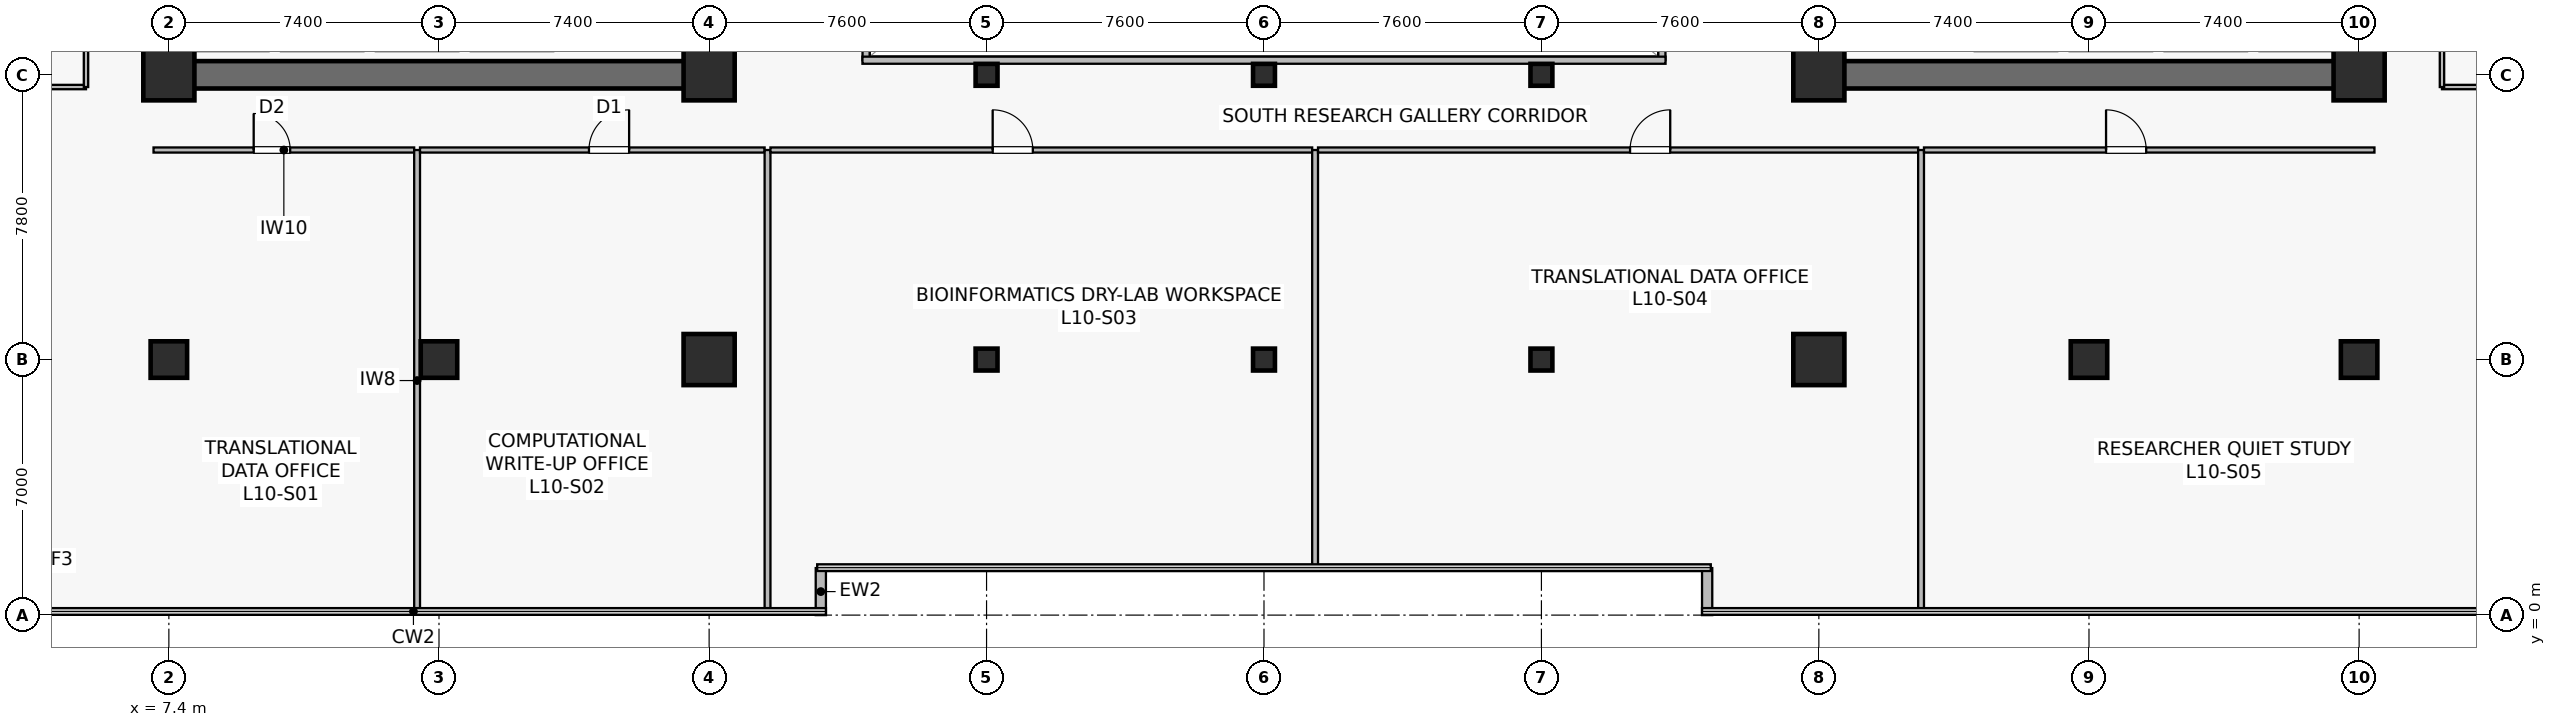
"""IFC4 building model, lengths in metres.
Left out: names, types, materials, properties, quantities, classifications, styles, units other than length and angle.
Written with IfcOpenShell. Run it as: python <this file> out.ifc"""

import sys

from ifc_helpers import new_model, si_unit, direction, frame, frame_2d, origin, origin_2d, place, context, subcontext, project, spatial, rectangle, hollow_rectangle, extrude, source, transform, mapped, element, fill, save


model = new_model("IFC4")
c1 = context("Model", 3, precision=1e-05, world=origin(), true_north=direction((0.0, 1.0)))
c2 = subcontext(c1, "Body", "Model", "MODEL_VIEW")
j1 = project(units=[si_unit("LENGTHUNIT", "METRE"), si_unit("PLANEANGLEUNIT", "RADIAN")], contexts=[c1])
p1 = place(None, origin())
s1 = spatial("IfcSite", under=j1, at=p1, CompositionType="ELEMENT")
p2 = place(p1, origin())
s2 = spatial("IfcBuilding", under=s1, at=p2, CompositionType="ELEMENT")
p3 = place(p2, frame((0.0, 0.0, 41.6)))
s3 = spatial("IfcBuildingStorey", under=s2, at=p3, CompositionType="ELEMENT", Elevation=41.6)
p4 = place(p3, frame((7.025, 14.8, 0.0), z_axis=(0.0, 0.0, 1.0), x_axis=(1.0, 0.0, 0.0)))
e1 = element("IfcWall", 1, at=p4, inside=s3, PredefinedType="SHEAR", context=c2, shape_type="SweptSolid", body=[
    extrude(rectangle(XDim=15.55, YDim=0.75, at=frame_2d((7.775, 0.0))), origin(), (0.0, 0.0, 1.0), 3.78),
])
p5 = place(p3, frame((7.4, 15.175, 0.0), z_axis=(0.0, 0.0, 1.0), x_axis=(0.0, 1.0, 0.0)))
e2 = element("IfcWall", 2, at=p5, inside=s3, PredefinedType="SHEAR", context=c2, shape_type="SweptSolid", body=[
    extrude(rectangle(XDim=18.25, YDim=0.75, at=frame_2d((9.125, 0.0))), origin(), (0.0, 0.0, 1.0), 3.78),
])
p6 = place(p3, frame((22.2, 15.175, 0.0), z_axis=(0.0, 0.0, 1.0), x_axis=(0.0, 1.0, 0.0)))
e3 = element("IfcWall", 3, at=p6, inside=s3, PredefinedType="SHEAR", context=c2, shape_type="SweptSolid", body=[
    extrude(rectangle(XDim=18.25, YDim=0.75, at=frame_2d((9.125, 0.0))), origin(), (0.0, 0.0, 1.0), 3.78),
])
p7 = place(p6, frame((3.375, 0.0, 0.0)))
e4 = element("IfcOpeningElement", 4, at=p7, cuts=e3, PredefinedType="OPENING", context=c2, shape_type="SweptSolid", body=[
    extrude(rectangle(XDim=1.42, YDim=2.2, at=frame_2d((0.71, 1.1))), frame((0.0, 0.385, 0.0), z_axis=(0.0, -1.0, 0.0), x_axis=(1.0, 0.0, 0.0)), (0.0, 0.0, 1.0), 0.77),
])
p8 = place(p3, frame((52.225, 14.8, 0.0), z_axis=(0.0, 0.0, 1.0), x_axis=(1.0, 0.0, 0.0)))
e5 = element("IfcWall", 5, at=p8, inside=s3, PredefinedType="SHEAR", context=c2, shape_type="SweptSolid", body=[
    extrude(rectangle(XDim=15.55, YDim=0.75, at=frame_2d((7.775, 0.0))), origin(), (0.0, 0.0, 1.0), 3.78),
])
p9 = place(p3, frame((52.6, 15.175, 0.0), z_axis=(0.0, 0.0, 1.0), x_axis=(0.0, 1.0, 0.0)))
e6 = element("IfcWall", 6, at=p9, inside=s3, PredefinedType="SHEAR", context=c2, shape_type="SweptSolid", body=[
    extrude(rectangle(XDim=18.25, YDim=0.75, at=frame_2d((9.125, 0.0))), origin(), (0.0, 0.0, 1.0), 3.78),
])
p10 = place(p9, frame((3.375, 0.0, 0.0)))
e7 = element("IfcOpeningElement", 7, at=p10, cuts=e6, PredefinedType="OPENING", context=c2, shape_type="SweptSolid", body=[
    extrude(rectangle(XDim=1.42, YDim=2.2, at=frame_2d((0.71, 1.1))), frame((0.0, 0.385, 0.0), z_axis=(0.0, -1.0, 0.0), x_axis=(1.0, 0.0, 0.0)), (0.0, 0.0, 1.0), 0.77),
])
p11 = place(p3, frame((67.4, 15.175, 0.0), z_axis=(0.0, 0.0, 1.0), x_axis=(0.0, 1.0, 0.0)))
e8 = element("IfcWall", 8, at=p11, inside=s3, PredefinedType="SHEAR", context=c2, shape_type="SweptSolid", body=[
    extrude(rectangle(XDim=18.25, YDim=0.75, at=frame_2d((9.125, 0.0))), origin(), (0.0, 0.0, 1.0), 3.78),
])
m1 = source(origin(), c2, "Body", "SweptSolid", [
    extrude(rectangle(XDim=1.0, YDim=1.0, at=origin_2d()), origin(), (0.0, 0.0, 1.0), 4.1),
])
p12 = place(p3, frame((14.8, 7.0, 0.0), z_axis=(0.0, 0.0, 1.0), x_axis=(1.0, 0.0, 0.0)))
e9 = element("IfcColumn", 9, at=p12, inside=s3, PredefinedType="COLUMN", context=c2, shape_type="MappedRepresentation", body=[
    mapped(m1, transform((0.0, 0.0, 0.0), scale=1.0)),
])
m2 = source(origin(), c2, "Body", "SweptSolid", [
    extrude(rectangle(XDim=1.4, YDim=1.4, at=origin_2d()), origin(), (0.0, 0.0, 1.0), 4.1),
])
for number, where, z_axis, x_axis in (
    (10, (22.2, 7.0, 0.0), (0.0, 0.0, 1.0), (1.0, 0.0, 0.0)),
    (11, (7.4, 14.8, 0.0), (0.0, 0.0, 1.0), (1.0, 0.0, 0.0)),
    (12, (22.2, 14.8, 0.0), (0.0, 0.0, 1.0), (1.0, 0.0, 0.0)),
    (13, (52.6, 7.0, 0.0), (0.0, 0.0, 1.0), (1.0, 0.0, 0.0)),
):
    element("IfcColumn", number, at=place(p3, frame(where, z_axis=z_axis, x_axis=x_axis)), inside=s3, PredefinedType="COLUMN", context=c2, shape_type="MappedRepresentation", body=[
        mapped(m2, transform((0.0, 0.0, 0.0), scale=1.0)),
    ])
p13 = place(p3, frame((60.0, 7.0, 0.0), z_axis=(0.0, 0.0, 1.0), x_axis=(1.0, 0.0, 0.0)))
e14 = element("IfcColumn", 14, at=p13, inside=s3, PredefinedType="COLUMN", context=c2, shape_type="MappedRepresentation", body=[
    mapped(m1, transform((0.0, 0.0, 0.0), scale=1.0)),
])
for number, where, z_axis, x_axis in (
    (15, (52.6, 14.8, 0.0), (0.0, 0.0, 1.0), (1.0, 0.0, 0.0)),
    (16, (67.4, 14.8, 0.0), (0.0, 0.0, 1.0), (1.0, 0.0, 0.0)),
):
    element("IfcColumn", number, at=place(p3, frame(where, z_axis=z_axis, x_axis=x_axis)), inside=s3, PredefinedType="COLUMN", context=c2, shape_type="MappedRepresentation", body=[
        mapped(m2, transform((0.0, 0.0, 0.0), scale=1.0)),
    ])
for number, where, z_axis, x_axis in (
    (17, (7.4, 7.0, 0.0), (0.0, 0.0, 1.0), (1.0, 0.0, 0.0)),
    (18, (67.4, 7.0, 0.0), (0.0, 0.0, 1.0), (1.0, 0.0, 0.0)),
):
    element("IfcColumn", number, at=place(p3, frame(where, z_axis=z_axis, x_axis=x_axis)), inside=s3, PredefinedType="COLUMN", context=c2, shape_type="MappedRepresentation", body=[
        mapped(m1, transform((0.0, 0.0, 0.0), scale=1.0)),
    ])
m3 = source(origin(), c2, "Body", "SweptSolid", [
    extrude(hollow_rectangle(XDim=0.6, YDim=0.6, WallThickness=0.028, at=origin_2d()), origin(), (0.0, 0.0, 1.0), 4.1),
])
for number, where, z_axis, x_axis in (
    (19, (29.8, 7.0, 0.0), (0.0, 0.0, 1.0), (1.0, 0.0, 0.0)),
    (20, (29.8, 14.8, 0.0), (0.0, 0.0, 1.0), (1.0, 0.0, 0.0)),
    (21, (37.4, 7.0, 0.0), (0.0, 0.0, 1.0), (1.0, 0.0, 0.0)),
    (22, (37.4, 14.8, 0.0), (0.0, 0.0, 1.0), (1.0, 0.0, 0.0)),
    (23, (45.0, 7.0, 0.0), (0.0, 0.0, 1.0), (1.0, 0.0, 0.0)),
    (24, (45.0, 14.8, 0.0), (0.0, 0.0, 1.0), (1.0, 0.0, 0.0)),
):
    element("IfcColumn", number, at=place(p3, frame(where, z_axis=z_axis, x_axis=x_axis)), inside=s3, PredefinedType="COLUMN", context=c2, shape_type="MappedRepresentation", body=[
        mapped(m3, transform((0.0, 0.0, 0.0), scale=1.0)),
    ])
for number, where, z_axis, x_axis in (
    (25, (25.26, 0.0, 0.0), (0.0, 0.0, 1.0), (0.0, 1.0, 0.0)),
    (26, (49.54, 1.288, 0.0), (0.0, 0.0, 1.0), (0.0, -1.0, 0.0)),
):
    element("IfcWall", number, at=place(p3, frame(where, z_axis=z_axis, x_axis=x_axis)), inside=s3, PredefinedType="STANDARD", context=c2, shape_type="SweptSolid", body=[
        extrude(rectangle(XDim=1.288, YDim=0.28, at=frame_2d((0.644, 0.0))), origin(), (0.0, 0.0, 1.0), 3.78),
    ])
p14 = place(p3, frame((26.5, 15.2, 0.0), z_axis=(0.0, 0.0, 1.0), x_axis=(0.0, 1.0, 0.0)))
e27 = element("IfcWall", 27, at=p14, inside=s3, PredefinedType="SOLIDWALL", context=c2, shape_type="SweptSolid", body=[
    extrude(rectangle(XDim=18.2, YDim=0.195, at=frame_2d((9.1, 0.0))), origin(), (0.0, 0.0, 1.0), 3.78),
])
p15 = place(p14, frame((1.8, 0.0, 0.9)))
e28 = element("IfcOpeningElement", 28, at=p15, cuts=e27, PredefinedType="OPENING", context=c2, shape_type="SweptSolid", body=[
    extrude(rectangle(XDim=1.5, YDim=1.4, at=frame_2d((0.75, 0.7))), frame((0.0, 0.107, 0.0), z_axis=(0.0, -1.0, 0.0), x_axis=(1.0, 0.0, 0.0)), (0.0, 0.0, 1.0), 0.215),
])
p16 = place(p14, frame((13.2, 0.0, 0.9)))
e29 = element("IfcOpeningElement", 29, at=p16, cuts=e27, PredefinedType="OPENING", context=c2, shape_type="SweptSolid", body=[
    extrude(rectangle(XDim=1.5, YDim=1.4, at=frame_2d((0.75, 0.7))), frame((0.0, 0.107, 0.0), z_axis=(0.0, -1.0, 0.0), x_axis=(1.0, 0.0, 0.0)), (0.0, 0.0, 1.0), 0.215),
])
p17 = place(p3, frame((48.3, 15.2, 0.0), z_axis=(0.0, 0.0, 1.0), x_axis=(0.0, 1.0, 0.0)))
e30 = element("IfcWall", 30, at=p17, inside=s3, PredefinedType="SOLIDWALL", context=c2, shape_type="SweptSolid", body=[
    extrude(rectangle(XDim=18.2, YDim=0.195, at=frame_2d((9.1, 0.0))), origin(), (0.0, 0.0, 1.0), 3.78),
])
p18 = place(p17, frame((1.8, 0.0, 0.9)))
e31 = element("IfcOpeningElement", 31, at=p18, cuts=e30, PredefinedType="OPENING", context=c2, shape_type="SweptSolid", body=[
    extrude(rectangle(XDim=1.5, YDim=1.4, at=frame_2d((0.75, 0.7))), frame((0.0, 0.107, 0.0), z_axis=(0.0, -1.0, 0.0), x_axis=(1.0, 0.0, 0.0)), (0.0, 0.0, 1.0), 0.215),
])
p19 = place(p17, frame((13.2, 0.0, 0.9)))
e32 = element("IfcOpeningElement", 32, at=p19, cuts=e30, PredefinedType="OPENING", context=c2, shape_type="SweptSolid", body=[
    extrude(rectangle(XDim=1.5, YDim=1.4, at=frame_2d((0.75, 0.7))), frame((0.0, 0.107, 0.0), z_axis=(0.0, -1.0, 0.0), x_axis=(1.0, 0.0, 0.0)), (0.0, 0.0, 1.0), 0.215),
])
p20 = place(p3, frame((26.4, 15.2, 0.0), z_axis=(0.0, 0.0, 1.0), x_axis=(1.0, 0.0, 0.0)))
e33 = element("IfcWall", 33, at=p20, inside=s3, PredefinedType="SOLIDWALL", context=c2, shape_type="SweptSolid", body=[
    extrude(rectangle(XDim=22.0, YDim=0.195, at=frame_2d((11.0, 0.0))), origin(), (0.0, 0.0, 1.0), 3.78),
])
p21 = place(p3, frame((6.98, 12.74, 0.0), z_axis=(0.0, 0.0, 1.0), x_axis=(1.0, 0.0, 0.0)))
e34 = element("IfcWall", 34, at=p21, inside=s3, PredefinedType="PARTITIONING", context=c2, shape_type="SweptSolid", body=[
    extrude(rectangle(XDim=7.14, YDim=0.14, at=frame_2d((3.57, 0.0))), origin(), (0.0, 0.0, 1.0), 3.265),
])
p22 = place(p21, frame((2.744, 0.0, 0.0)))
e35 = element("IfcOpeningElement", 35, at=p22, cuts=e34, PredefinedType="OPENING", context=c2, shape_type="SweptSolid", body=[
    extrude(rectangle(XDim=1.0, YDim=2.15, at=frame_2d((0.5, 1.075))), frame((0.0, 0.08, 0.0), z_axis=(0.0, -1.0, 0.0), x_axis=(1.0, 0.0, 0.0)), (0.0, 0.0, 1.0), 0.16),
])
p23 = place(p3, frame((14.2, 0.11, 0.0), z_axis=(0.0, 0.0, 1.0), x_axis=(0.0, 1.0, 0.0)))
e36 = element("IfcWall", 36, at=p23, inside=s3, PredefinedType="PARTITIONING", context=c2, shape_type="SweptSolid", body=[
    extrude(rectangle(XDim=12.63, YDim=0.16, at=frame_2d((6.315, 0.0))), origin(), (0.0, 0.0, 1.0), 3.015),
])
p24 = place(p3, frame((14.28, 12.74, 0.0), z_axis=(0.0, 0.0, 1.0), x_axis=(1.0, 0.0, 0.0)))
e37 = element("IfcWall", 37, at=p24, inside=s3, PredefinedType="PARTITIONING", context=c2, shape_type="SweptSolid", body=[
    extrude(rectangle(XDim=9.44, YDim=0.14, at=frame_2d((4.72, 0.0))), origin(), (0.0, 0.0, 1.0), 3.065),
])
p25 = place(p24, frame((4.628, 0.0, 0.0)))
e38 = element("IfcOpeningElement", 38, at=p25, cuts=e37, PredefinedType="OPENING", context=c2, shape_type="SweptSolid", body=[
    extrude(rectangle(XDim=1.1, YDim=2.18, at=frame_2d((0.55, 1.09))), frame((0.0, 0.08, 0.0), z_axis=(0.0, -1.0, 0.0), x_axis=(1.0, 0.0, 0.0)), (0.0, 0.0, 1.0), 0.16),
])
p26 = place(p3, frame((23.8, 0.11, 0.0), z_axis=(0.0, 0.0, 1.0), x_axis=(0.0, 1.0, 0.0)))
e39 = element("IfcWall", 39, at=p26, inside=s3, PredefinedType="PARTITIONING", context=c2, shape_type="SweptSolid", body=[
    extrude(rectangle(XDim=12.63, YDim=0.16, at=frame_2d((6.315, 0.0))), origin(), (0.0, 0.0, 1.0), 3.015),
])
p27 = place(p3, frame((23.88, 12.74, 0.0), z_axis=(0.0, 0.0, 1.0), x_axis=(1.0, 0.0, 0.0)))
e40 = element("IfcWall", 40, at=p27, inside=s3, PredefinedType="PARTITIONING", context=c2, shape_type="SweptSolid", body=[
    extrude(rectangle(XDim=14.84, YDim=0.14, at=frame_2d((7.42, 0.0))), origin(), (0.0, 0.0, 1.0), 3.065),
])
p28 = place(p27, frame((6.088, 0.0, 0.0)))
e41 = element("IfcOpeningElement", 41, at=p28, cuts=e40, PredefinedType="OPENING", context=c2, shape_type="SweptSolid", body=[
    extrude(rectangle(XDim=1.1, YDim=2.18, at=frame_2d((0.55, 1.09))), frame((0.0, 0.08, 0.0), z_axis=(0.0, -1.0, 0.0), x_axis=(1.0, 0.0, 0.0)), (0.0, 0.0, 1.0), 0.16),
])
p29 = place(p3, frame((38.8, 1.31, 0.0), z_axis=(0.0, 0.0, 1.0), x_axis=(0.0, 1.0, 0.0)))
e42 = element("IfcWall", 42, at=p29, inside=s3, PredefinedType="PARTITIONING", context=c2, shape_type="SweptSolid", body=[
    extrude(rectangle(XDim=11.43, YDim=0.16, at=frame_2d((5.715, 0.0))), origin(), (0.0, 0.0, 1.0), 3.015),
])
p30 = place(p3, frame((38.88, 12.74, 0.0), z_axis=(0.0, 0.0, 1.0), x_axis=(1.0, 0.0, 0.0)))
e43 = element("IfcWall", 43, at=p30, inside=s3, PredefinedType="PARTITIONING", context=c2, shape_type="SweptSolid", body=[
    extrude(rectangle(XDim=16.44, YDim=0.14, at=frame_2d((8.22, 0.0))), origin(), (0.0, 0.0, 1.0), 3.065),
])
p31 = place(p30, frame((8.548, 0.0, 0.0)))
e44 = element("IfcOpeningElement", 44, at=p31, cuts=e43, PredefinedType="OPENING", context=c2, shape_type="SweptSolid", body=[
    extrude(rectangle(XDim=1.1, YDim=2.18, at=frame_2d((0.55, 1.09))), frame((0.0, 0.08, 0.0), z_axis=(0.0, -1.0, 0.0), x_axis=(1.0, 0.0, 0.0)), (0.0, 0.0, 1.0), 0.16),
])
p32 = place(p3, frame((55.4, 0.11, 0.0), z_axis=(0.0, 0.0, 1.0), x_axis=(0.0, 1.0, 0.0)))
e45 = element("IfcWall", 45, at=p32, inside=s3, PredefinedType="PARTITIONING", context=c2, shape_type="SweptSolid", body=[
    extrude(rectangle(XDim=12.63, YDim=0.16, at=frame_2d((6.315, 0.0))), origin(), (0.0, 0.0, 1.0), 3.015),
])
p33 = place(p3, frame((55.48, 12.74, 0.0), z_axis=(0.0, 0.0, 1.0), x_axis=(1.0, 0.0, 0.0)))
e46 = element("IfcWall", 46, at=p33, inside=s3, PredefinedType="PARTITIONING", context=c2, shape_type="SweptSolid", body=[
    extrude(rectangle(XDim=12.34, YDim=0.14, at=frame_2d((6.17, 0.0))), origin(), (0.0, 0.0, 1.0), 3.065),
])
p34 = place(p33, frame((4.988, 0.0, 0.0)))
e47 = element("IfcOpeningElement", 47, at=p34, cuts=e46, PredefinedType="OPENING", context=c2, shape_type="SweptSolid", body=[
    extrude(rectangle(XDim=1.1, YDim=2.18, at=frame_2d((0.55, 1.09))), frame((0.0, 0.08, 0.0), z_axis=(0.0, -1.0, 0.0), x_axis=(1.0, 0.0, 0.0)), (0.0, 0.0, 1.0), 0.16),
])
p35 = place(p3, frame((0.11, 14.465, 0.0), z_axis=(0.0, 0.0, 1.0), x_axis=(1.0, 0.0, 0.0)))
e48 = element("IfcWall", 48, at=p35, inside=s3, PredefinedType="PARTITIONING", context=c2, shape_type="SweptSolid", body=[
    extrude(rectangle(XDim=5.02, YDim=0.12, at=frame_2d((2.51, 0.0))), origin(), (0.0, 0.0, 1.0), 3.78),
])
p36 = place(p3, frame((5.13, 14.465, 0.0), z_axis=(0.0, 0.0, 1.0), x_axis=(0.0, 1.0, 0.0)))
e49 = element("IfcWall", 49, at=p36, inside=s3, PredefinedType="PARTITIONING", context=c2, shape_type="SweptSolid", body=[
    extrude(rectangle(XDim=10.675, YDim=0.12, at=frame_2d((5.337, 0.0))), origin(), (0.0, 0.0, 1.0), 3.78),
])
p37 = place(p36, frame((4.887, 0.0, 0.0)))
e50 = element("IfcOpeningElement", 50, at=p37, cuts=e49, PredefinedType="OPENING", context=c2, shape_type="SweptSolid", body=[
    extrude(rectangle(XDim=0.9, YDim=2.1, at=frame_2d((0.45, 1.05))), frame((0.0, 0.07, 0.0), z_axis=(0.0, -1.0, 0.0), x_axis=(1.0, 0.0, 0.0)), (0.0, 0.0, 1.0), 0.14),
])
p38 = place(p3, frame((69.67, 14.465, 0.0), z_axis=(0.0, 0.0, 1.0), x_axis=(1.0, 0.0, 0.0)))
e51 = element("IfcWall", 51, at=p38, inside=s3, PredefinedType="PARTITIONING", context=c2, shape_type="SweptSolid", body=[
    extrude(rectangle(XDim=5.02, YDim=0.12, at=frame_2d((2.51, 0.0))), origin(), (0.0, 0.0, 1.0), 3.78),
])
p39 = place(p3, frame((69.67, 14.465, 0.0), z_axis=(0.0, 0.0, 1.0), x_axis=(0.0, 1.0, 0.0)))
e52 = element("IfcWall", 52, at=p39, inside=s3, PredefinedType="PARTITIONING", context=c2, shape_type="SweptSolid", body=[
    extrude(rectangle(XDim=5.075, YDim=0.12, at=frame_2d((2.538, 0.0))), origin(), (0.0, 0.0, 1.0), 3.78),
])
p40 = place(p39, frame((2.087, 0.0, 0.0)))
e53 = element("IfcOpeningElement", 53, at=p40, cuts=e52, PredefinedType="OPENING", context=c2, shape_type="SweptSolid", body=[
    extrude(rectangle(XDim=0.9, YDim=2.1, at=frame_2d((0.45, 1.05))), frame((0.0, 0.07, 0.0), z_axis=(0.0, -1.0, 0.0), x_axis=(1.0, 0.0, 0.0)), (0.0, 0.0, 1.0), 0.14),
])
m4 = source(origin(), c2, "Body", "SweptSolid", [
    extrude(rectangle(XDim=1.0, YDim=2.15, at=frame_2d((0.5, 1.075))), frame((0.0, 0.025, 0.0), z_axis=(0.0, -1.0, 0.0), x_axis=(1.0, 0.0, 0.0)), (0.0, 0.0, 1.0), 0.05),
])
p41 = place(p22, origin())
e54 = element("IfcDoor", 54, at=p41, inside=s3, OperationType="SINGLE_SWING_LEFT", PredefinedType="DOOR", context=c2, shape_type="MappedRepresentation", body=[
    mapped(m4, transform((0.0, 0.0, 0.0), scale=1.0)),
])
fill(e35, e54)
m5 = source(origin(), c2, "Body", "SweptSolid", [
    extrude(rectangle(XDim=1.1, YDim=2.18, at=frame_2d((0.55, 1.09))), frame((0.0, 0.025, 0.0), z_axis=(0.0, -1.0, 0.0), x_axis=(1.0, 0.0, 0.0)), (0.0, 0.0, 1.0), 0.05),
])
p42 = place(p25, origin())
e55 = element("IfcDoor", 55, at=p42, inside=s3, OperationType="SINGLE_SWING_RIGHT", PredefinedType="DOOR", context=c2, shape_type="MappedRepresentation", body=[
    mapped(m5, transform((0.0, 0.0, 0.0), scale=1.0)),
])
fill(e38, e55)
p43 = place(p28, origin())
e56 = element("IfcDoor", 56, at=p43, inside=s3, OperationType="SINGLE_SWING_LEFT", PredefinedType="DOOR", context=c2, shape_type="MappedRepresentation", body=[
    mapped(m5, transform((0.0, 0.0, 0.0), scale=1.0)),
])
fill(e41, e56)
p44 = place(p31, origin())
e57 = element("IfcDoor", 57, at=p44, inside=s3, OperationType="SINGLE_SWING_RIGHT", PredefinedType="DOOR", context=c2, shape_type="MappedRepresentation", body=[
    mapped(m5, transform((0.0, 0.0, 0.0), scale=1.0)),
])
fill(e44, e57)
p45 = place(p34, origin())
e58 = element("IfcDoor", 58, at=p45, inside=s3, OperationType="SINGLE_SWING_LEFT", PredefinedType="DOOR", context=c2, shape_type="MappedRepresentation", body=[
    mapped(m5, transform((0.0, 0.0, 0.0), scale=1.0)),
])
fill(e47, e58)
save(model, sys.argv[1])
